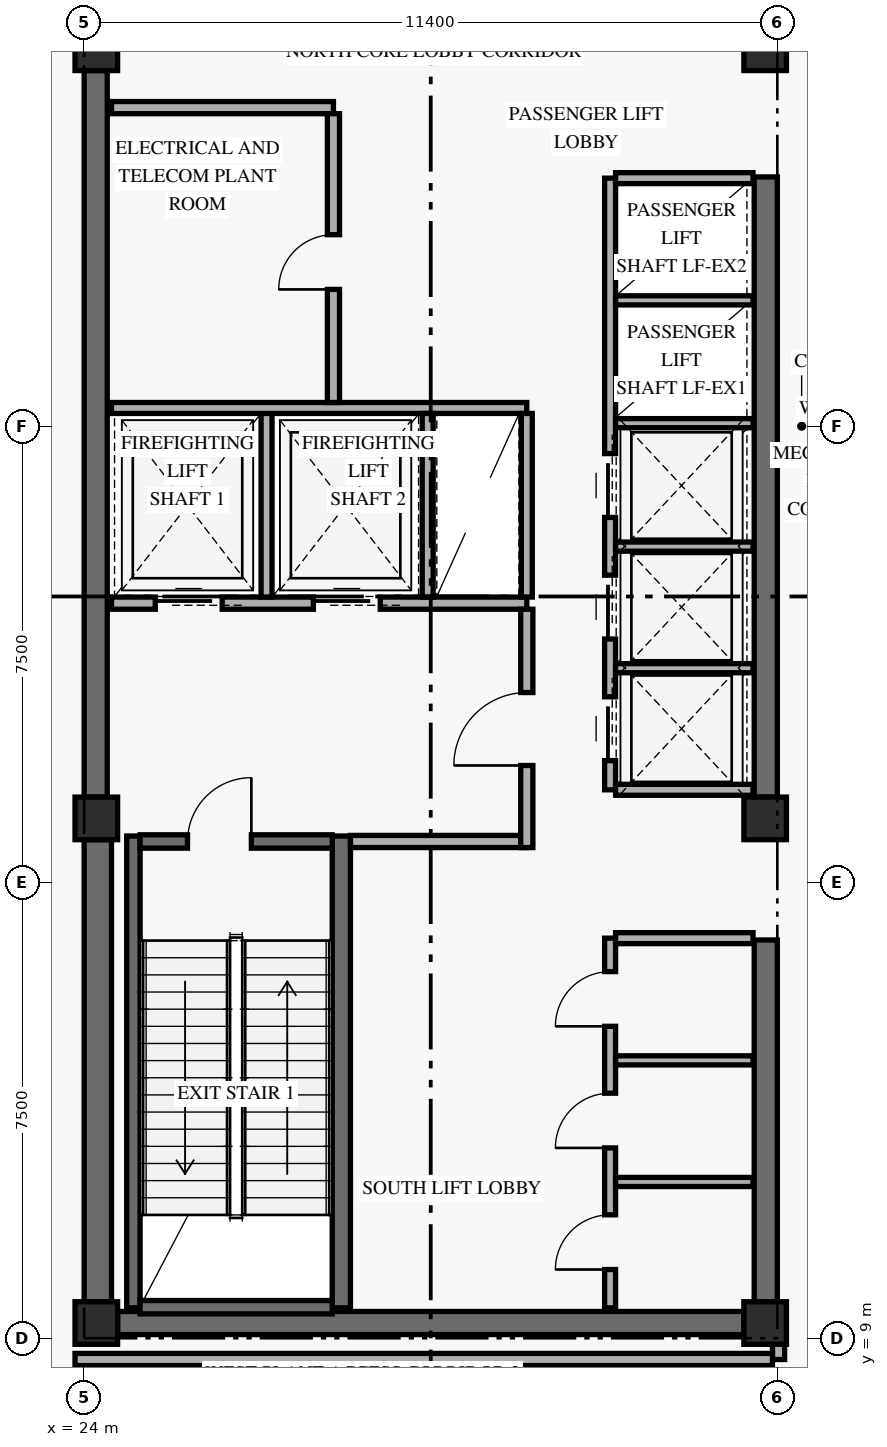
"""IFC4 building model, lengths in metres.
Left out: names, types, materials, properties, quantities, classifications, styles, units other than length and angle.
Written with IfcOpenShell. Run it as: python <this file> out.ifc"""

import sys

from ifc_helpers import new_model, si_unit, direction, frame, frame_2d, origin, origin_2d, place, context, subcontext, project, spatial, rectangle, extrude, element, fill, save


model = new_model("IFC4")
c1 = context("Model", 3, precision=1e-05, world=origin(), true_north=direction((0.0, 1.0)))
c2 = subcontext(c1, "Body", "Model", "MODEL_VIEW")
j1 = project(units=[si_unit("LENGTHUNIT", "METRE"), si_unit("PLANEANGLEUNIT", "RADIAN")], contexts=[c1])
p1 = place(None, origin())
s1 = spatial("IfcSite", under=j1, at=p1, CompositionType="ELEMENT")
p2 = place(p1, origin())
s2 = spatial("IfcBuilding", under=s1, at=p2, CompositionType="ELEMENT")
p3 = place(p2, frame((0.0, 0.0, 199.8)))
s3 = spatial("IfcBuildingStorey", under=s2, at=p3, CompositionType="ELEMENT", Elevation=199.8)
p4 = place(p3, frame((24.225, 9.6, 0.0), z_axis=(0.0, 0.0, 1.0), x_axis=(0.0, 1.0, 0.0)))
e1 = element("IfcWall", 1, at=p4, inside=s3, PredefinedType="SHEAR", context=c2, shape_type="SweptSolid", body=[
    extrude(rectangle(XDim=7.6, YDim=0.45, at=frame_2d((3.8, 0.0))), origin(), (0.0, 0.0, 1.0), 5.148),
])
p5 = place(p3, frame((24.19, 17.9, 0.0), z_axis=(0.0, 0.0, 1.0), x_axis=(0.0, 1.0, 0.0)))
e2 = element("IfcWall", 2, at=p5, inside=s3, PredefinedType="SHEAR", context=c2, shape_type="SweptSolid", body=[
    extrude(rectangle(XDim=11.95, YDim=0.38, at=frame_2d((5.975, 0.0))), origin(), (0.0, 0.0, 1.0), 5.148),
])
p6 = place(p3, frame((35.21, 9.6, 0.0), z_axis=(0.0, 0.0, 1.0), x_axis=(0.0, 1.0, 0.0)))
e3 = element("IfcWall", 3, at=p6, inside=s3, PredefinedType="SHEAR", context=c2, shape_type="SweptSolid", body=[
    extrude(rectangle(XDim=5.95, YDim=0.38, at=frame_2d((2.975, 0.0))), origin(), (0.0, 0.0, 1.0), 5.148),
])
p7 = place(p3, frame((35.21, 17.9, 0.0), z_axis=(0.0, 0.0, 1.0), x_axis=(0.0, 1.0, 0.0)))
e4 = element("IfcWall", 4, at=p7, inside=s3, PredefinedType="SHEAR", context=c2, shape_type="SweptSolid", body=[
    extrude(rectangle(XDim=10.2, YDim=0.38, at=frame_2d((5.1, 0.0))), origin(), (0.0, 0.0, 1.0), 5.148),
])
p8 = place(p3, frame((24.55, 9.25, 0.0), z_axis=(0.0, 0.0, 1.0), x_axis=(1.0, 0.0, 0.0)))
e5 = element("IfcWall", 5, at=p8, inside=s3, PredefinedType="SHEAR", context=c2, shape_type="SweptSolid", body=[
    extrude(rectangle(XDim=10.3, YDim=0.38, at=frame_2d((5.15, 0.0))), origin(), (0.0, 0.0, 1.0), 5.76),
])
p9 = place(p3, frame((24.81, 9.5, 0.0), z_axis=(0.0, 0.0, 1.0), x_axis=(0.0, 1.0, 0.0)))
e6 = element("IfcWall", 6, at=p9, inside=s3, PredefinedType="SHEAR", context=c2, shape_type="SweptSolid", body=[
    extrude(rectangle(XDim=7.76, YDim=0.22, at=frame_2d((3.88, 0.0))), origin(), (0.0, 0.0, 1.0), 5.76),
])
p10 = place(p3, frame((28.23, 9.5, 0.0), z_axis=(0.0, 0.0, 1.0), x_axis=(0.0, 1.0, 0.0)))
e7 = element("IfcWall", 7, at=p10, inside=s3, PredefinedType="SHEAR", context=c2, shape_type="SweptSolid", body=[
    extrude(rectangle(XDim=7.76, YDim=0.3, at=frame_2d((3.88, 0.0))), origin(), (0.0, 0.0, 1.0), 5.76),
])
p11 = place(p3, frame((24.92, 9.51, 0.0), z_axis=(0.0, 0.0, 1.0), x_axis=(1.0, 0.0, 0.0)))
e8 = element("IfcWall", 8, at=p11, inside=s3, PredefinedType="SHEAR", context=c2, shape_type="SweptSolid", body=[
    extrude(rectangle(XDim=3.16, YDim=0.22, at=frame_2d((1.58, 0.0))), origin(), (0.0, 0.0, 1.0), 5.76),
])
p12 = place(p3, frame((24.92, 17.17, 0.0), z_axis=(0.0, 0.0, 1.0), x_axis=(1.0, 0.0, 0.0)))
e9 = element("IfcWall", 9, at=p12, inside=s3, PredefinedType="SHEAR", context=c2, shape_type="SweptSolid", body=[
    extrude(rectangle(XDim=3.16, YDim=0.22, at=frame_2d((1.58, 0.0))), origin(), (0.0, 0.0, 1.0), 5.76),
])
p13 = place(p12, frame((0.78, 0.0, 0.0)))
e10 = element("IfcOpeningElement", 10, at=p13, cuts=e9, PredefinedType="OPENING", context=c2, shape_type="SweptSolid", body=[
    extrude(rectangle(XDim=1.05, YDim=2.15, at=frame_2d((0.525, 1.075))), frame((0.0, 0.12, 0.0), z_axis=(0.0, -1.0, 0.0), x_axis=(1.0, 0.0, 0.0)), (0.0, 0.0, 1.0), 0.24),
])
for number, where, z_axis, x_axis in (
    (11, (24.2, 9.25, 0.0), (0.0, 0.0, 1.0), (1.0, 0.0, 0.0)),
    (12, (24.2, 17.55, 0.0), (0.0, 0.0, 1.0), (1.0, 0.0, 0.0)),
    (13, (24.2, 30.2, 0.0), (0.0, 0.0, 1.0), (1.0, 0.0, 0.0)),
    (14, (35.2, 9.25, 0.0), (0.0, 0.0, 1.0), (1.0, 0.0, 0.0)),
    (15, (35.2, 17.55, 0.0), (0.0, 0.0, 1.0), (1.0, 0.0, 0.0)),
    (16, (35.2, 30.2, 0.0), (0.0, 0.0, 1.0), (1.0, 0.0, 0.0)),
):
    element("IfcColumn", number, at=place(p3, frame(where, z_axis=z_axis, x_axis=x_axis)), inside=s3, PredefinedType="COLUMN", context=c2, shape_type="SweptSolid", body=[
        extrude(rectangle(XDim=0.7, YDim=0.7, at=origin_2d()), origin(), (0.0, 0.0, 1.0), 6.0),
    ])
p14 = place(p3, frame((24.45, 21.09, 0.0), z_axis=(0.0, 0.0, 1.0), x_axis=(1.0, 0.0, 0.0)))
e17 = element("IfcWall", 17, at=p14, inside=s3, PredefinedType="STANDARD", context=c2, shape_type="SweptSolid", body=[
    extrude(rectangle(XDim=6.83, YDim=0.2, at=frame_2d((3.415, 0.0))), origin(), (0.0, 0.0, 1.0), 5.76),
])
p15 = place(p14, frame((0.72, 0.0, 0.0)))
e18 = element("IfcOpeningElement", 18, at=p15, cuts=e17, PredefinedType="OPENING", context=c2, shape_type="SweptSolid", body=[
    extrude(rectangle(XDim=1.1, YDim=2.2, at=frame_2d((0.55, 1.1))), frame((0.0, 0.11, 0.0), z_axis=(0.0, -1.0, 0.0), x_axis=(1.0, 0.0, 0.0)), (0.0, 0.0, 1.0), 0.22),
])
p16 = place(p14, frame((3.32, 0.0, 0.0)))
e19 = element("IfcOpeningElement", 19, at=p16, cuts=e17, PredefinedType="OPENING", context=c2, shape_type="SweptSolid", body=[
    extrude(rectangle(XDim=1.1, YDim=2.2, at=frame_2d((0.55, 1.1))), frame((0.0, 0.11, 0.0), z_axis=(0.0, -1.0, 0.0), x_axis=(1.0, 0.0, 0.0)), (0.0, 0.0, 1.0), 0.22),
])
p17 = place(p3, frame((28.38, 17.17, 0.0), z_axis=(0.0, 0.0, 1.0), x_axis=(1.0, 0.0, 0.0)))
e20 = element("IfcWall", 20, at=p17, inside=s3, PredefinedType="STANDARD", context=c2, shape_type="SweptSolid", body=[
    extrude(rectangle(XDim=2.9, YDim=0.2, at=frame_2d((1.45, 0.0))), origin(), (0.0, 0.0, 1.0), 5.76),
])
p18 = place(p3, frame((31.28, 17.07, 0.0), z_axis=(0.0, 0.0, 1.0), x_axis=(0.0, 1.0, 0.0)))
e21 = element("IfcWall", 21, at=p18, inside=s3, PredefinedType="STANDARD", context=c2, shape_type="SweptSolid", body=[
    extrude(rectangle(XDim=3.92, YDim=0.2, at=frame_2d((1.96, 0.0))), origin(), (0.0, 0.0, 1.0), 5.13),
])
p19 = place(p18, frame((1.35, 0.0, 0.0)))
e22 = element("IfcOpeningElement", 22, at=p19, cuts=e21, PredefinedType="OPENING", context=c2, shape_type="SweptSolid", body=[
    extrude(rectangle(XDim=1.2, YDim=2.15, at=frame_2d((0.6, 1.075))), frame((0.0, 0.11, 0.0), z_axis=(0.0, -1.0, 0.0), x_axis=(1.0, 0.0, 0.0)), (0.0, 0.0, 1.0), 0.22),
])
p20 = place(p3, frame((27.0, 21.19, 0.0), z_axis=(0.0, 0.0, 1.0), x_axis=(0.0, 1.0, 0.0)))
e23 = element("IfcWall", 23, at=p20, inside=s3, PredefinedType="STANDARD", context=c2, shape_type="SweptSolid", body=[
    extrude(rectangle(XDim=3.11, YDim=0.18, at=frame_2d((1.555, 0.0))), origin(), (0.0, 0.0, 1.0), 5.76),
])
p21 = place(p3, frame((24.45, 24.3, 0.0), z_axis=(0.0, 0.0, 1.0), x_axis=(1.0, 0.0, 0.0)))
e24 = element("IfcWall", 24, at=p21, inside=s3, PredefinedType="STANDARD", context=c2, shape_type="SweptSolid", body=[
    extrude(rectangle(XDim=6.83, YDim=0.18, at=frame_2d((3.415, 0.0))), origin(), (0.0, 0.0, 1.0), 5.76),
])
for number, where, z_axis, x_axis in (
    (25, (29.65, 21.19, 0.0), (0.0, 0.0, 1.0), (0.0, 1.0, 0.0)),
    (26, (31.28, 21.19, 0.0), (0.0, 0.0, 1.0), (0.0, 1.0, 0.0)),
):
    element("IfcWall", number, at=place(p3, frame(where, z_axis=z_axis, x_axis=x_axis)), inside=s3, PredefinedType="STANDARD", context=c2, shape_type="SweptSolid", body=[
        extrude(rectangle(XDim=3.02, YDim=0.18, at=frame_2d((1.51, 0.0))), origin(), (0.0, 0.0, 1.0), 5.76),
    ])
p22 = place(p3, frame((24.45, 29.24, 0.0), z_axis=(0.0, 0.0, 1.0), x_axis=(1.0, 0.0, 0.0)))
e27 = element("IfcWall", 27, at=p22, inside=s3, PredefinedType="STANDARD", context=c2, shape_type="SweptSolid", body=[
    extrude(rectangle(XDim=3.65, YDim=0.2, at=frame_2d((1.825, 0.0))), origin(), (0.0, 0.0, 1.0), 5.76),
])
p23 = place(p3, frame((28.1, 24.39, 0.0), z_axis=(0.0, 0.0, 1.0), x_axis=(0.0, 1.0, 0.0)))
e28 = element("IfcWall", 28, at=p23, inside=s3, PredefinedType="STANDARD", context=c2, shape_type="SweptSolid", body=[
    extrude(rectangle(XDim=4.75, YDim=0.2, at=frame_2d((2.375, 0.0))), origin(), (0.0, 0.0, 1.0), 5.76),
])
p24 = place(p23, frame((1.86, 0.0, 0.0)))
e29 = element("IfcOpeningElement", 29, at=p24, cuts=e28, PredefinedType="OPENING", context=c2, shape_type="SweptSolid", body=[
    extrude(rectangle(XDim=0.9, YDim=2.1, at=frame_2d((0.45, 1.05))), frame((0.0, 0.11, 0.0), z_axis=(0.0, -1.0, 0.0), x_axis=(1.0, 0.0, 0.0)), (0.0, 0.0, 1.0), 0.22),
])
p25 = place(p3, frame((32.65, 9.5, 0.0), z_axis=(0.0, 0.0, 1.0), x_axis=(0.0, 1.0, 0.0)))
e30 = element("IfcWall", 30, at=p25, inside=s3, PredefinedType="STANDARD", context=c2, shape_type="SweptSolid", body=[
    extrude(rectangle(XDim=6.08, YDim=0.18, at=frame_2d((3.04, 0.0))), origin(), (0.0, 0.0, 1.0), 5.76),
])
p26 = place(p25, frame((0.63, 0.0, 0.0)))
e31 = element("IfcOpeningElement", 31, at=p26, cuts=e30, PredefinedType="OPENING", context=c2, shape_type="SweptSolid", body=[
    extrude(rectangle(XDim=0.9, YDim=2.1, at=frame_2d((0.45, 1.05))), frame((0.0, 0.1, 0.0), z_axis=(0.0, -1.0, 0.0), x_axis=(1.0, 0.0, 0.0)), (0.0, 0.0, 1.0), 0.2),
])
p27 = place(p25, frame((2.63, 0.0, 0.0)))
e32 = element("IfcOpeningElement", 32, at=p27, cuts=e30, PredefinedType="OPENING", context=c2, shape_type="SweptSolid", body=[
    extrude(rectangle(XDim=0.9, YDim=2.1, at=frame_2d((0.45, 1.05))), frame((0.0, 0.1, 0.0), z_axis=(0.0, -1.0, 0.0), x_axis=(1.0, 0.0, 0.0)), (0.0, 0.0, 1.0), 0.2),
])
p28 = place(p25, frame((4.63, 0.0, 0.0)))
e33 = element("IfcOpeningElement", 33, at=p28, cuts=e30, PredefinedType="OPENING", context=c2, shape_type="SweptSolid", body=[
    extrude(rectangle(XDim=0.9, YDim=2.1, at=frame_2d((0.45, 1.05))), frame((0.0, 0.1, 0.0), z_axis=(0.0, -1.0, 0.0), x_axis=(1.0, 0.0, 0.0)), (0.0, 0.0, 1.0), 0.2),
])
p29 = place(p3, frame((32.74, 15.58, 0.0), z_axis=(0.0, 0.0, 1.0), x_axis=(1.0, 0.0, 0.0)))
e34 = element("IfcWall", 34, at=p29, inside=s3, PredefinedType="STANDARD", context=c2, shape_type="SweptSolid", body=[
    extrude(rectangle(XDim=2.26, YDim=0.18, at=frame_2d((1.13, 0.0))), origin(), (0.0, 0.0, 1.0), 5.76),
])
for number, where, z_axis, x_axis in (
    (35, (32.74, 11.57, 0.0), (0.0, 0.0, 1.0), (1.0, 0.0, 0.0)),
    (36, (32.74, 13.57, 0.0), (0.0, 0.0, 1.0), (1.0, 0.0, 0.0)),
):
    element("IfcWall", number, at=place(p3, frame(where, z_axis=z_axis, x_axis=x_axis)), inside=s3, PredefinedType="STANDARD", context=c2, shape_type="SweptSolid", body=[
        extrude(rectangle(XDim=2.26, YDim=0.15, at=frame_2d((1.13, 0.0))), origin(), (0.0, 0.0, 1.0), 5.76),
    ])
p30 = place(p3, frame((32.65, 18.02, 0.0), z_axis=(0.0, 0.0, 1.0), x_axis=(0.0, 1.0, 0.0)))
e37 = element("IfcWall", 37, at=p30, inside=s3, PredefinedType="STANDARD", context=c2, shape_type="SweptSolid", body=[
    extrude(rectangle(XDim=10.06, YDim=0.18, at=frame_2d((5.03, 0.0))), origin(), (0.0, 0.0, 1.0), 5.76),
])
p31 = place(p30, frame((0.48, 0.0, 0.0)))
e38 = element("IfcOpeningElement", 38, at=p31, cuts=e37, PredefinedType="OPENING", context=c2, shape_type="SweptSolid", body=[
    extrude(rectangle(XDim=1.05, YDim=2.2, at=frame_2d((0.525, 1.1))), frame((0.0, 0.1, 0.0), z_axis=(0.0, -1.0, 0.0), x_axis=(1.0, 0.0, 0.0)), (0.0, 0.0, 1.0), 0.2),
])
p32 = place(p30, frame((2.48, 0.0, 0.0)))
e39 = element("IfcOpeningElement", 39, at=p32, cuts=e37, PredefinedType="OPENING", context=c2, shape_type="SweptSolid", body=[
    extrude(rectangle(XDim=1.05, YDim=2.2, at=frame_2d((0.525, 1.1))), frame((0.0, 0.1, 0.0), z_axis=(0.0, -1.0, 0.0), x_axis=(1.0, 0.0, 0.0)), (0.0, 0.0, 1.0), 0.2),
])
p33 = place(p30, frame((4.48, 0.0, 0.0)))
e40 = element("IfcOpeningElement", 40, at=p33, cuts=e37, PredefinedType="OPENING", context=c2, shape_type="SweptSolid", body=[
    extrude(rectangle(XDim=1.05, YDim=2.2, at=frame_2d((0.525, 1.1))), frame((0.0, 0.1, 0.0), z_axis=(0.0, -1.0, 0.0), x_axis=(1.0, 0.0, 0.0)), (0.0, 0.0, 1.0), 0.2),
])
for number, where, z_axis, x_axis in (
    (41, (32.74, 18.02, 0.0), (0.0, 0.0, 1.0), (1.0, 0.0, 0.0)),
    (42, (32.74, 28.08, 0.0), (0.0, 0.0, 1.0), (1.0, 0.0, 0.0)),
):
    element("IfcWall", number, at=place(p3, frame(where, z_axis=z_axis, x_axis=x_axis)), inside=s3, PredefinedType="STANDARD", context=c2, shape_type="SweptSolid", body=[
        extrude(rectangle(XDim=2.26, YDim=0.18, at=frame_2d((1.13, 0.0))), origin(), (0.0, 0.0, 1.0), 5.76),
    ])
for number, where, z_axis, x_axis in (
    (43, (32.74, 20.02, 0.0), (0.0, 0.0, 1.0), (1.0, 0.0, 0.0)),
    (44, (32.74, 22.02, 0.0), (0.0, 0.0, 1.0), (1.0, 0.0, 0.0)),
    (45, (32.74, 24.05, 0.0), (0.0, 0.0, 1.0), (1.0, 0.0, 0.0)),
    (46, (32.74, 26.07, 0.0), (0.0, 0.0, 1.0), (1.0, 0.0, 0.0)),
):
    element("IfcWall", number, at=place(p3, frame(where, z_axis=z_axis, x_axis=x_axis)), inside=s3, PredefinedType="STANDARD", context=c2, shape_type="SweptSolid", body=[
        extrude(rectangle(XDim=2.26, YDim=0.15, at=frame_2d((1.13, 0.0))), origin(), (0.0, 0.0, 1.0), 5.76),
    ])
p34 = place(p3, frame((35.42, 8.65, 0.0), z_axis=(0.0, 0.0, 1.0), x_axis=(0.0, 1.0, 0.0)))
e47 = element("IfcWall", 47, at=p34, inside=s3, PredefinedType="STANDARD", context=c2, shape_type="SweptSolid", body=[
    extrude(rectangle(XDim=0.6, YDim=0.2, at=frame_2d((0.3, 0.0))), origin(), (0.0, 0.0, 1.0), 5.13),
])
p35 = place(p3, frame((23.85, 8.65, 0.0), z_axis=(0.0, 0.0, 1.0), x_axis=(1.0, 0.0, 0.0)))
e48 = element("IfcWall", 48, at=p35, inside=s3, PredefinedType="STANDARD", context=c2, shape_type="SweptSolid", body=[
    extrude(rectangle(XDim=11.47, YDim=0.2, at=frame_2d((5.735, 0.0))), origin(), (0.0, 0.0, 1.0), 5.13),
])
p36 = place(p13, frame((1.05, 0.0, 0.0), z_axis=(0.0, 0.0, 1.0), x_axis=(-1.0, 0.0, 0.0)))
e49 = element("IfcDoor", 49, at=p36, inside=s3, OperationType="SINGLE_SWING_LEFT", PredefinedType="DOOR", context=c2, shape_type="SweptSolid", body=[
    extrude(rectangle(XDim=1.05, YDim=2.15, at=frame_2d((0.525, 1.075))), frame((0.0, 0.025, 0.0), z_axis=(0.0, -1.0, 0.0), x_axis=(1.0, 0.0, 0.0)), (0.0, 0.0, 1.0), 0.05),
])
fill(e10, e49)
p37 = place(p15, origin())
e50 = element("IfcDoor", 50, at=p37, inside=s3, OperationType="SLIDING_TO_LEFT", PredefinedType="DOOR", context=c2, shape_type="SweptSolid", body=[
    extrude(rectangle(XDim=1.1, YDim=2.2, at=frame_2d((0.55, 1.1))), frame((0.0, 0.025, 0.0), z_axis=(0.0, -1.0, 0.0), x_axis=(1.0, 0.0, 0.0)), (0.0, 0.0, 1.0), 0.05),
])
fill(e18, e50)
p38 = place(p16, origin())
e51 = element("IfcDoor", 51, at=p38, inside=s3, OperationType="SLIDING_TO_LEFT", PredefinedType="DOOR", context=c2, shape_type="SweptSolid", body=[
    extrude(rectangle(XDim=1.1, YDim=2.2, at=frame_2d((0.55, 1.1))), frame((0.0, 0.025, 0.0), z_axis=(0.0, -1.0, 0.0), x_axis=(1.0, 0.0, 0.0)), (0.0, 0.0, 1.0), 0.05),
])
fill(e19, e51)
p39 = place(p19, origin())
e52 = element("IfcDoor", 52, at=p39, inside=s3, OperationType="SINGLE_SWING_LEFT", PredefinedType="DOOR", context=c2, shape_type="SweptSolid", body=[
    extrude(rectangle(XDim=1.2, YDim=2.15, at=frame_2d((0.6, 1.075))), frame((0.0, 0.025, 0.0), z_axis=(0.0, -1.0, 0.0), x_axis=(1.0, 0.0, 0.0)), (0.0, 0.0, 1.0), 0.05),
])
fill(e22, e52)
p40 = place(p24, origin())
e53 = element("IfcDoor", 53, at=p40, inside=s3, OperationType="SINGLE_SWING_LEFT", PredefinedType="DOOR", context=c2, shape_type="SweptSolid", body=[
    extrude(rectangle(XDim=0.9, YDim=2.1, at=frame_2d((0.45, 1.05))), frame((0.0, 0.025, 0.0), z_axis=(0.0, -1.0, 0.0), x_axis=(1.0, 0.0, 0.0)), (0.0, 0.0, 1.0), 0.05),
])
fill(e29, e53)
p41 = place(p26, origin())
e54 = element("IfcDoor", 54, at=p41, inside=s3, OperationType="SINGLE_SWING_LEFT", PredefinedType="DOOR", context=c2, shape_type="SweptSolid", body=[
    extrude(rectangle(XDim=0.9, YDim=2.1, at=frame_2d((0.45, 1.05))), frame((0.0, 0.025, 0.0), z_axis=(0.0, -1.0, 0.0), x_axis=(1.0, 0.0, 0.0)), (0.0, 0.0, 1.0), 0.05),
])
fill(e31, e54)
p42 = place(p27, origin())
e55 = element("IfcDoor", 55, at=p42, inside=s3, OperationType="SINGLE_SWING_LEFT", PredefinedType="DOOR", context=c2, shape_type="SweptSolid", body=[
    extrude(rectangle(XDim=0.9, YDim=2.1, at=frame_2d((0.45, 1.05))), frame((0.0, 0.025, 0.0), z_axis=(0.0, -1.0, 0.0), x_axis=(1.0, 0.0, 0.0)), (0.0, 0.0, 1.0), 0.05),
])
fill(e32, e55)
p43 = place(p28, origin())
e56 = element("IfcDoor", 56, at=p43, inside=s3, OperationType="SINGLE_SWING_LEFT", PredefinedType="DOOR", context=c2, shape_type="SweptSolid", body=[
    extrude(rectangle(XDim=0.9, YDim=2.1, at=frame_2d((0.45, 1.05))), frame((0.0, 0.025, 0.0), z_axis=(0.0, -1.0, 0.0), x_axis=(1.0, 0.0, 0.0)), (0.0, 0.0, 1.0), 0.05),
])
fill(e33, e56)
p44 = place(p31, origin())
e57 = element("IfcDoor", 57, at=p44, inside=s3, OperationType="SLIDING_TO_LEFT", PredefinedType="DOOR", context=c2, shape_type="SweptSolid", body=[
    extrude(rectangle(XDim=1.05, YDim=2.2, at=frame_2d((0.525, 1.1))), frame((0.0, 0.025, 0.0), z_axis=(0.0, -1.0, 0.0), x_axis=(1.0, 0.0, 0.0)), (0.0, 0.0, 1.0), 0.05),
])
fill(e38, e57)
p45 = place(p32, origin())
e58 = element("IfcDoor", 58, at=p45, inside=s3, OperationType="SLIDING_TO_LEFT", PredefinedType="DOOR", context=c2, shape_type="SweptSolid", body=[
    extrude(rectangle(XDim=1.05, YDim=2.2, at=frame_2d((0.525, 1.1))), frame((0.0, 0.025, 0.0), z_axis=(0.0, -1.0, 0.0), x_axis=(1.0, 0.0, 0.0)), (0.0, 0.0, 1.0), 0.05),
])
fill(e39, e58)
p46 = place(p33, origin())
e59 = element("IfcDoor", 59, at=p46, inside=s3, OperationType="SLIDING_TO_LEFT", PredefinedType="DOOR", context=c2, shape_type="SweptSolid", body=[
    extrude(rectangle(XDim=1.05, YDim=2.2, at=frame_2d((0.525, 1.1))), frame((0.0, 0.025, 0.0), z_axis=(0.0, -1.0, 0.0), x_axis=(1.0, 0.0, 0.0)), (0.0, 0.0, 1.0), 0.05),
])
fill(e40, e59)
save(model, sys.argv[1])
